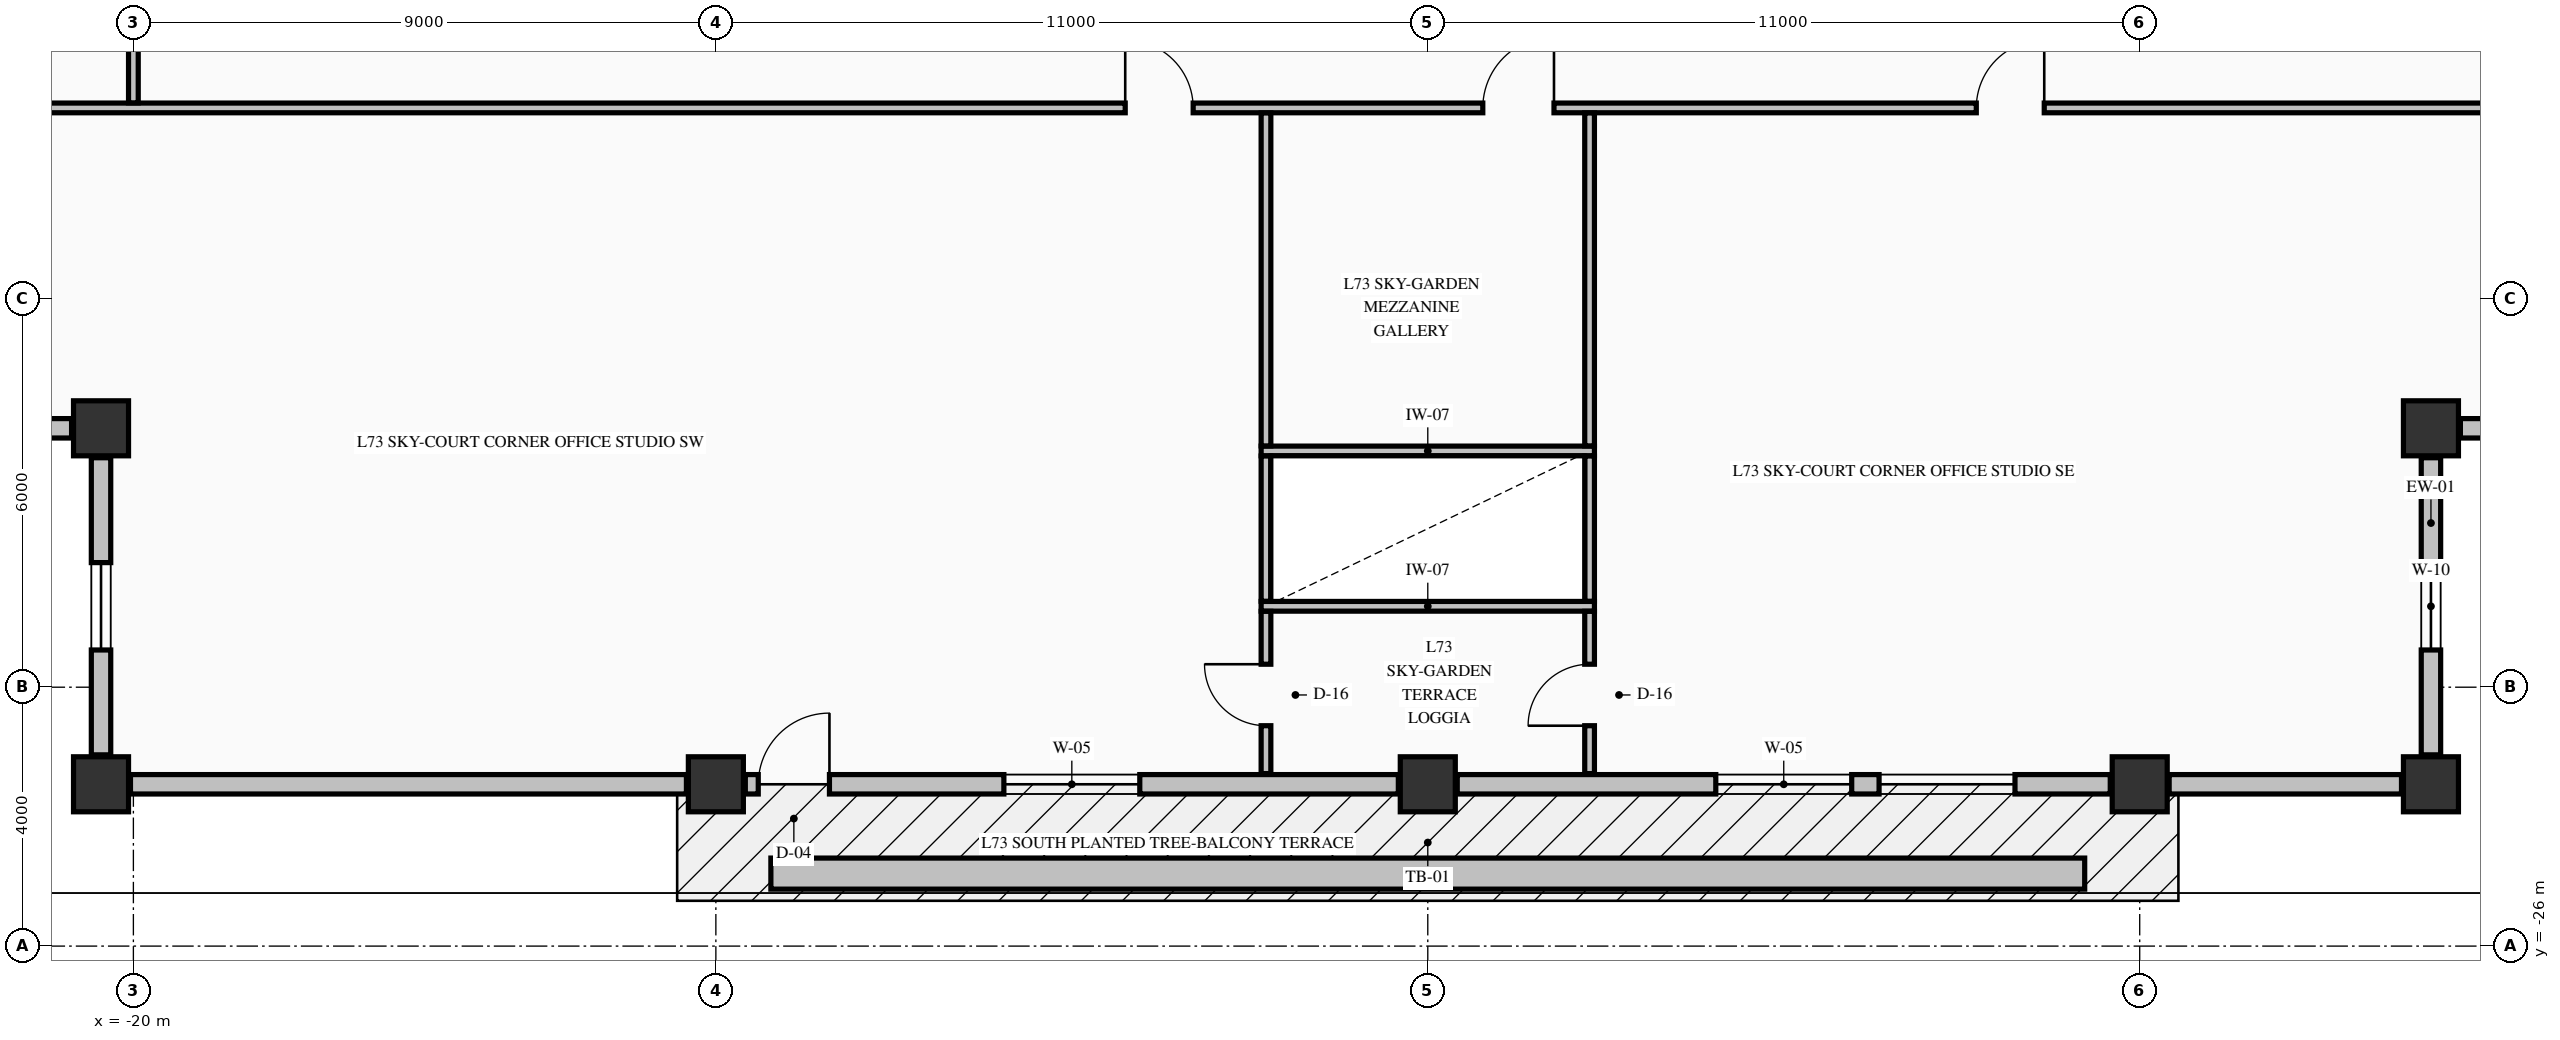
"""IFC4 building model, lengths in metres.
Left out: names, types, materials, properties, quantities, classifications, styles, units other than length and angle.
Written with IfcOpenShell. Run it as: python <this file> out.ifc"""

import sys

from ifc_helpers import new_model, si_unit, direction, frame, frame_2d, origin, origin_2d, place, context, subcontext, project, spatial, rectangle, extrude, element, fill, save


model = new_model("IFC4")
c1 = context("Model", 3, precision=1e-05, world=origin(), true_north=direction((0.0, 1.0)))
c2 = subcontext(c1, "Body", "Model", "MODEL_VIEW")
j1 = project(units=[si_unit("LENGTHUNIT", "METRE"), si_unit("PLANEANGLEUNIT", "RADIAN")], contexts=[c1])
p1 = place(None, origin())
s1 = spatial("IfcSite", under=j1, at=p1, CompositionType="ELEMENT")
p2 = place(p1, origin())
s2 = spatial("IfcBuilding", under=s1, at=p2, CompositionType="ELEMENT")
p3 = place(p2, frame((0.0, 0.0, 274.32)))
s3 = spatial("IfcBuildingStorey", under=s2, at=p3, CompositionType="ELEMENT", Elevation=274.32)
for number, where, z_axis, x_axis in (
    (1, (-20.5, -23.5, -0.25), (0.0, 0.0, 1.0), (1.0, 0.0, 0.0)),
    (2, (-11.0, -23.5, -0.25), (0.0, 0.0, 1.0), (1.0, 0.0, 0.0)),
    (3, (0.0, -23.5, -0.25), (0.0, 0.0, 1.0), (1.0, 0.0, 0.0)),
    (4, (11.0, -23.5, -0.25), (0.0, 0.0, 1.0), (1.0, 0.0, 0.0)),
    (5, (15.5, -23.5, -0.25), (0.0, 0.0, 1.0), (1.0, 0.0, 0.0)),
    (6, (-20.5, -18.0, -0.25), (0.0, 0.0, 1.0), (1.0, 0.0, 0.0)),
    (7, (15.5, -18.0, -0.25), (0.0, 0.0, 1.0), (1.0, 0.0, 0.0)),
):
    element("IfcColumn", number, at=place(p3, frame(where, z_axis=z_axis, x_axis=x_axis)), inside=s3, PredefinedType="COLUMN", context=c2, shape_type="SweptSolid", body=[
        extrude(rectangle(XDim=0.85, YDim=0.85, at=origin_2d()), origin(), (0.0, 0.0, 1.0), 3.565),
    ])
p4 = place(p3, frame((15.5, -23.045, 0.0), z_axis=(0.0, 0.0, 1.0), x_axis=(0.0, 1.0, 0.0)))
e8 = element("IfcWall", 8, at=p4, inside=s3, PredefinedType="STANDARD", context=c2, shape_type="SweptSolid", body=[
    extrude(rectangle(XDim=4.59, YDim=0.3, at=frame_2d((2.295, 0.0))), origin(), (0.0, 0.0, 1.0), 2.707),
])
p5 = place(p4, frame((1.62, 0.0, 0.68)))
e9 = element("IfcOpeningElement", 9, at=p5, cuts=e8, PredefinedType="OPENING", context=c2, shape_type="SweptSolid", body=[
    extrude(rectangle(XDim=1.35, YDim=1.42, at=frame_2d((0.675, 0.71))), frame((0.0, 0.16, 0.0), z_axis=(0.0, -1.0, 0.0), x_axis=(1.0, 0.0, 0.0)), (0.0, 0.0, 1.0), 0.32),
])
p6 = place(p3, frame((15.955, -18.0, 0.0), z_axis=(0.0, 0.0, 1.0), x_axis=(1.0, 0.0, 0.0)))
e10 = element("IfcWall", 10, at=p6, inside=s3, PredefinedType="STANDARD", context=c2, shape_type="SweptSolid", body=[
    extrude(rectangle(XDim=4.59, YDim=0.3, at=frame_2d((2.295, 0.0))), origin(), (0.0, 0.0, 1.0), 2.707),
])
p7 = place(p6, frame((1.62, 0.0, 0.68)))
e11 = element("IfcOpeningElement", 11, at=p7, cuts=e10, PredefinedType="OPENING", context=c2, shape_type="SweptSolid", body=[
    extrude(rectangle(XDim=1.35, YDim=1.42, at=frame_2d((0.675, 0.71))), frame((0.0, 0.16, 0.0), z_axis=(0.0, -1.0, 0.0), x_axis=(1.0, 0.0, 0.0)), (0.0, 0.0, 1.0), 0.32),
])
p8 = place(p3, frame((-25.545, -18.0, 0.0), z_axis=(0.0, 0.0, 1.0), x_axis=(1.0, 0.0, 0.0)))
e12 = element("IfcWall", 12, at=p8, inside=s3, PredefinedType="STANDARD", context=c2, shape_type="SweptSolid", body=[
    extrude(rectangle(XDim=4.59, YDim=0.3, at=frame_2d((2.295, 0.0))), origin(), (0.0, 0.0, 1.0), 2.707),
])
p9 = place(p8, frame((1.62, 0.0, 0.68)))
e13 = element("IfcOpeningElement", 13, at=p9, cuts=e12, PredefinedType="OPENING", context=c2, shape_type="SweptSolid", body=[
    extrude(rectangle(XDim=1.35, YDim=1.42, at=frame_2d((0.675, 0.71))), frame((0.0, 0.16, 0.0), z_axis=(0.0, -1.0, 0.0), x_axis=(1.0, 0.0, 0.0)), (0.0, 0.0, 1.0), 0.32),
])
p10 = place(p3, frame((-20.5, -18.455, 0.0), z_axis=(0.0, 0.0, 1.0), x_axis=(0.0, -1.0, 0.0)))
e14 = element("IfcWall", 14, at=p10, inside=s3, PredefinedType="STANDARD", context=c2, shape_type="SweptSolid", body=[
    extrude(rectangle(XDim=4.59, YDim=0.3, at=frame_2d((2.295, 0.0))), origin(), (0.0, 0.0, 1.0), 2.707),
])
p11 = place(p10, frame((1.62, 0.0, 0.68)))
e15 = element("IfcOpeningElement", 15, at=p11, cuts=e14, PredefinedType="OPENING", context=c2, shape_type="SweptSolid", body=[
    extrude(rectangle(XDim=1.35, YDim=1.42, at=frame_2d((0.675, 0.71))), frame((0.0, 0.16, 0.0), z_axis=(0.0, -1.0, 0.0), x_axis=(1.0, 0.0, 0.0)), (0.0, 0.0, 1.0), 0.32),
])
p12 = place(p3, frame((-20.045, -23.5, 0.0), z_axis=(0.0, 0.0, 1.0), x_axis=(1.0, 0.0, 0.0)))
e16 = element("IfcWall", 16, at=p12, inside=s3, PredefinedType="STANDARD", context=c2, shape_type="SweptSolid", body=[
    extrude(rectangle(XDim=8.59, YDim=0.3, at=frame_2d((4.295, 0.0))), origin(), (0.0, 0.0, 1.0), 2.707),
])
p13 = place(p3, frame((-10.545, -23.5, 0.0), z_axis=(0.0, 0.0, 1.0), x_axis=(1.0, 0.0, 0.0)))
e17 = element("IfcWall", 17, at=p13, inside=s3, PredefinedType="STANDARD", context=c2, shape_type="SweptSolid", body=[
    extrude(rectangle(XDim=10.09, YDim=0.3, at=frame_2d((5.045, 0.0))), origin(), (0.0, 0.0, 1.0), 2.707),
])
p14 = place(p13, frame((0.2, 0.0, 0.0)))
e18 = element("IfcOpeningElement", 18, at=p14, cuts=e17, PredefinedType="OPENING", context=c2, shape_type="SweptSolid", body=[
    extrude(rectangle(XDim=1.1, YDim=2.15, at=frame_2d((0.55, 1.075))), frame((0.0, 0.16, 0.0), z_axis=(0.0, -1.0, 0.0), x_axis=(1.0, 0.0, 0.0)), (0.0, 0.0, 1.0), 0.32),
])
p15 = place(p13, frame((3.995, 0.0, 0.7)))
e19 = element("IfcOpeningElement", 19, at=p15, cuts=e17, PredefinedType="OPENING", context=c2, shape_type="SweptSolid", body=[
    extrude(rectangle(XDim=2.1, YDim=1.5, at=frame_2d((1.05, 0.75))), frame((0.0, 0.16, 0.0), z_axis=(0.0, -1.0, 0.0), x_axis=(1.0, 0.0, 0.0)), (0.0, 0.0, 1.0), 0.32),
])
p16 = place(p3, frame((0.455, -23.5, 0.0), z_axis=(0.0, 0.0, 1.0), x_axis=(1.0, 0.0, 0.0)))
e20 = element("IfcWall", 20, at=p16, inside=s3, PredefinedType="STANDARD", context=c2, shape_type="SweptSolid", body=[
    extrude(rectangle(XDim=10.09, YDim=0.3, at=frame_2d((5.045, 0.0))), origin(), (0.0, 0.0, 1.0), 2.707),
])
p17 = place(p16, frame((3.995, 0.0, 0.7)))
e21 = element("IfcOpeningElement", 21, at=p17, cuts=e20, PredefinedType="OPENING", context=c2, shape_type="SweptSolid", body=[
    extrude(rectangle(XDim=2.1, YDim=1.5, at=frame_2d((1.05, 0.75))), frame((0.0, 0.16, 0.0), z_axis=(0.0, -1.0, 0.0), x_axis=(1.0, 0.0, 0.0)), (0.0, 0.0, 1.0), 0.32),
])
p18 = place(p16, frame((6.518, 0.0, 0.7)))
e22 = element("IfcOpeningElement", 22, at=p18, cuts=e20, PredefinedType="OPENING", context=c2, shape_type="SweptSolid", body=[
    extrude(rectangle(XDim=2.1, YDim=1.5, at=frame_2d((1.05, 0.75))), frame((0.0, 0.16, 0.0), z_axis=(0.0, -1.0, 0.0), x_axis=(1.0, 0.0, 0.0)), (0.0, 0.0, 1.0), 0.32),
])
p19 = place(p3, frame((11.455, -23.5, 0.0), z_axis=(0.0, 0.0, 1.0), x_axis=(1.0, 0.0, 0.0)))
e23 = element("IfcWall", 23, at=p19, inside=s3, PredefinedType="STANDARD", context=c2, shape_type="SweptSolid", body=[
    extrude(rectangle(XDim=3.59, YDim=0.3, at=frame_2d((1.795, 0.0))), origin(), (0.0, 0.0, 1.0), 2.707),
])
for number, where, z_axis, x_axis in (
    (24, (-2.575, -20.75, 0.0), (0.0, 0.0, 1.0), (1.0, 0.0, 0.0)),
    (25, (-2.575, -18.35, 0.0), (0.0, 0.0, 1.0), (1.0, 0.0, 0.0)),
):
    element("IfcWall", number, at=place(p3, frame(where, z_axis=z_axis, x_axis=x_axis)), inside=s3, PredefinedType="PARTITIONING", context=c2, shape_type="SweptSolid", body=[
        extrude(rectangle(XDim=5.15, YDim=0.15, at=frame_2d((2.575, 0.0))), origin(), (0.0, 0.0, 1.0), 3.315),
    ])
p20 = place(p3, frame((-25.835, -13.05, 0.0), z_axis=(0.0, 0.0, 1.0), x_axis=(1.0, 0.0, 0.0)))
e26 = element("IfcWall", 26, at=p20, inside=s3, PredefinedType="PARTITIONING", context=c2, shape_type="SweptSolid", body=[
    extrude(rectangle(XDim=45.91, YDim=0.15, at=frame_2d((22.955, 0.0))), origin(), (0.0, 0.0, 1.0), 3.315),
])
p21 = place(p20, frame((26.685, 0.0, 0.0)))
e27 = element("IfcOpeningElement", 27, at=p21, cuts=e26, PredefinedType="OPENING", context=c2, shape_type="SweptSolid", body=[
    extrude(rectangle(XDim=1.1, YDim=2.15, at=frame_2d((0.55, 1.075))), frame((0.0, 0.085, 0.0), z_axis=(0.0, -1.0, 0.0), x_axis=(1.0, 0.0, 0.0)), (0.0, 0.0, 1.0), 0.17),
])
p22 = place(p20, frame((21.16, 0.0, 0.0)))
e28 = element("IfcOpeningElement", 28, at=p22, cuts=e26, PredefinedType="OPENING", context=c2, shape_type="SweptSolid", body=[
    extrude(rectangle(XDim=1.05, YDim=2.15, at=frame_2d((0.525, 1.075))), frame((0.0, 0.085, 0.0), z_axis=(0.0, -1.0, 0.0), x_axis=(1.0, 0.0, 0.0)), (0.0, 0.0, 1.0), 0.17),
])
p23 = place(p20, frame((34.31, 0.0, 0.0)))
e29 = element("IfcOpeningElement", 29, at=p23, cuts=e26, PredefinedType="OPENING", context=c2, shape_type="SweptSolid", body=[
    extrude(rectangle(XDim=1.05, YDim=2.15, at=frame_2d((0.525, 1.075))), frame((0.0, 0.085, 0.0), z_axis=(0.0, -1.0, 0.0), x_axis=(1.0, 0.0, 0.0)), (0.0, 0.0, 1.0), 0.17),
])
p24 = place(p3, frame((-20.0, -12.972, 0.0), z_axis=(0.0, 0.0, 1.0), x_axis=(0.0, 1.0, 0.0)))
e30 = element("IfcWall", 30, at=p24, inside=s3, PredefinedType="PARTITIONING", context=c2, shape_type="SweptSolid", body=[
    extrude(rectangle(XDim=2.666, YDim=0.15, at=frame_2d((1.333, 0.0))), origin(), (0.0, 0.0, 1.0), 3.315),
])
p25 = place(p24, frame((0.997, 0.0, 0.0)))
e31 = element("IfcOpeningElement", 31, at=p25, cuts=e30, PredefinedType="OPENING", context=c2, shape_type="SweptSolid", body=[
    extrude(rectangle(XDim=0.95, YDim=2.15, at=frame_2d((0.475, 1.075))), frame((0.0, 0.085, 0.0), z_axis=(0.0, -1.0, 0.0), x_axis=(1.0, 0.0, 0.0)), (0.0, 0.0, 1.0), 0.17),
])
p26 = place(p3, frame((-2.5, -23.335, 0.0), z_axis=(0.0, 0.0, 1.0), x_axis=(0.0, 1.0, 0.0)))
e32 = element("IfcWall", 32, at=p26, inside=s3, PredefinedType="PARTITIONING", context=c2, shape_type="SweptSolid", body=[
    extrude(rectangle(XDim=2.507, YDim=0.15, at=frame_2d((1.253, 0.0))), origin(), (0.0, 0.0, 1.0), 3.315),
])
p27 = place(p26, frame((0.74, 0.0, 0.0)))
e33 = element("IfcOpeningElement", 33, at=p27, cuts=e32, PredefinedType="OPENING", context=c2, shape_type="SweptSolid", body=[
    extrude(rectangle(XDim=0.95, YDim=2.15, at=frame_2d((0.475, 1.075))), frame((0.0, 0.085, 0.0), z_axis=(0.0, -1.0, 0.0), x_axis=(1.0, 0.0, 0.0)), (0.0, 0.0, 1.0), 0.17),
])
p28 = place(p3, frame((-2.5, -20.672, 0.0), z_axis=(0.0, 0.0, 1.0), x_axis=(0.0, 1.0, 0.0)))
e34 = element("IfcWall", 34, at=p28, inside=s3, PredefinedType="PARTITIONING", context=c2, shape_type="SweptSolid", body=[
    extrude(rectangle(XDim=2.244, YDim=0.15, at=frame_2d((1.122, 0.0))), origin(), (0.0, 0.0, 1.0), 3.315),
])
p29 = place(p3, frame((-2.5, -18.272, 0.0), z_axis=(0.0, 0.0, 1.0), x_axis=(0.0, 1.0, 0.0)))
e35 = element("IfcWall", 35, at=p29, inside=s3, PredefinedType="PARTITIONING", context=c2, shape_type="SweptSolid", body=[
    extrude(rectangle(XDim=5.144, YDim=0.15, at=frame_2d((2.572, 0.0))), origin(), (0.0, 0.0, 1.0), 3.315),
])
p30 = place(p3, frame((2.5, -23.335, 0.0), z_axis=(0.0, 0.0, 1.0), x_axis=(0.0, 1.0, 0.0)))
e36 = element("IfcWall", 36, at=p30, inside=s3, PredefinedType="PARTITIONING", context=c2, shape_type="SweptSolid", body=[
    extrude(rectangle(XDim=2.507, YDim=0.15, at=frame_2d((1.253, 0.0))), origin(), (0.0, 0.0, 1.0), 3.315),
])
p31 = place(p30, frame((0.74, 0.0, 0.0)))
e37 = element("IfcOpeningElement", 37, at=p31, cuts=e36, PredefinedType="OPENING", context=c2, shape_type="SweptSolid", body=[
    extrude(rectangle(XDim=0.95, YDim=2.15, at=frame_2d((0.475, 1.075))), frame((0.0, 0.085, 0.0), z_axis=(0.0, -1.0, 0.0), x_axis=(1.0, 0.0, 0.0)), (0.0, 0.0, 1.0), 0.17),
])
p32 = place(p3, frame((2.5, -20.672, 0.0), z_axis=(0.0, 0.0, 1.0), x_axis=(0.0, 1.0, 0.0)))
e38 = element("IfcWall", 38, at=p32, inside=s3, PredefinedType="PARTITIONING", context=c2, shape_type="SweptSolid", body=[
    extrude(rectangle(XDim=2.244, YDim=0.15, at=frame_2d((1.122, 0.0))), origin(), (0.0, 0.0, 1.0), 3.315),
])
p33 = place(p3, frame((2.5, -18.272, 0.0), z_axis=(0.0, 0.0, 1.0), x_axis=(0.0, 1.0, 0.0)))
e39 = element("IfcWall", 39, at=p33, inside=s3, PredefinedType="PARTITIONING", context=c2, shape_type="SweptSolid", body=[
    extrude(rectangle(XDim=5.144, YDim=0.15, at=frame_2d((2.572, 0.0))), origin(), (0.0, 0.0, 1.0), 3.315),
])
p34 = place(p3, frame((-10.15, -24.88, -0.04), z_axis=(0.0, 0.0, 1.0), x_axis=(1.0, 0.0, 0.0)))
e40 = element("IfcWall", 40, at=p34, inside=s3, PredefinedType="PARAPET", context=c2, shape_type="SweptSolid", body=[
    extrude(rectangle(XDim=20.3, YDim=0.48, at=frame_2d((10.15, 0.0))), origin(), (0.0, 0.0, 1.0), 0.52),
])
p35 = place(p5, origin())
e41 = element("IfcWindow", 41, at=p35, inside=s3, PartitioningType="SINGLE_PANEL", PredefinedType="WINDOW", context=c2, shape_type="SweptSolid", body=[
    extrude(rectangle(XDim=1.35, YDim=1.42, at=frame_2d((0.675, 0.71))), frame((0.0, 0.03, 0.0), z_axis=(0.0, -1.0, 0.0), x_axis=(1.0, 0.0, 0.0)), (0.0, 0.0, 1.0), 0.06),
])
fill(e9, e41)
p36 = place(p11, origin())
e42 = element("IfcWindow", 42, at=p36, inside=s3, PartitioningType="SINGLE_PANEL", PredefinedType="WINDOW", context=c2, shape_type="SweptSolid", body=[
    extrude(rectangle(XDim=1.35, YDim=1.42, at=frame_2d((0.675, 0.71))), frame((0.0, 0.03, 0.0), z_axis=(0.0, -1.0, 0.0), x_axis=(1.0, 0.0, 0.0)), (0.0, 0.0, 1.0), 0.06),
])
fill(e15, e42)
p37 = place(p14, origin())
e43 = element("IfcDoor", 43, at=p37, inside=s3, OperationType="SINGLE_SWING_RIGHT", PredefinedType="DOOR", context=c2, shape_type="SweptSolid", body=[
    extrude(rectangle(XDim=1.1, YDim=2.15, at=frame_2d((0.55, 1.075))), frame((0.0, 0.025, 0.0), z_axis=(0.0, -1.0, 0.0), x_axis=(1.0, 0.0, 0.0)), (0.0, 0.0, 1.0), 0.05),
])
fill(e18, e43)
p38 = place(p15, origin())
e44 = element("IfcWindow", 44, at=p38, inside=s3, PartitioningType="SINGLE_PANEL", PredefinedType="WINDOW", context=c2, shape_type="SweptSolid", body=[
    extrude(rectangle(XDim=2.1, YDim=1.5, at=frame_2d((1.05, 0.75))), frame((0.0, 0.03, 0.0), z_axis=(0.0, -1.0, 0.0), x_axis=(1.0, 0.0, 0.0)), (0.0, 0.0, 1.0), 0.06),
])
fill(e19, e44)
p39 = place(p17, origin())
e45 = element("IfcWindow", 45, at=p39, inside=s3, PartitioningType="SINGLE_PANEL", PredefinedType="WINDOW", context=c2, shape_type="SweptSolid", body=[
    extrude(rectangle(XDim=2.1, YDim=1.5, at=frame_2d((1.05, 0.75))), frame((0.0, 0.03, 0.0), z_axis=(0.0, -1.0, 0.0), x_axis=(1.0, 0.0, 0.0)), (0.0, 0.0, 1.0), 0.06),
])
fill(e21, e45)
p40 = place(p18, origin())
e46 = element("IfcWindow", 46, at=p40, inside=s3, PartitioningType="SINGLE_PANEL", PredefinedType="WINDOW", context=c2, shape_type="SweptSolid", body=[
    extrude(rectangle(XDim=2.1, YDim=1.5, at=frame_2d((1.05, 0.75))), frame((0.0, 0.03, 0.0), z_axis=(0.0, -1.0, 0.0), x_axis=(1.0, 0.0, 0.0)), (0.0, 0.0, 1.0), 0.06),
])
fill(e22, e46)
p41 = place(p27, origin())
e47 = element("IfcDoor", 47, at=p41, inside=s3, OperationType="SINGLE_SWING_RIGHT", PredefinedType="DOOR", context=c2, shape_type="SweptSolid", body=[
    extrude(rectangle(XDim=0.95, YDim=2.15, at=frame_2d((0.475, 1.075))), frame((0.0, 0.025, 0.0), z_axis=(0.0, -1.0, 0.0), x_axis=(1.0, 0.0, 0.0)), (0.0, 0.0, 1.0), 0.05),
])
fill(e33, e47)
p42 = place(p31, origin())
e48 = element("IfcDoor", 48, at=p42, inside=s3, OperationType="SINGLE_SWING_LEFT", PredefinedType="DOOR", context=c2, shape_type="SweptSolid", body=[
    extrude(rectangle(XDim=0.95, YDim=2.15, at=frame_2d((0.475, 1.075))), frame((0.0, 0.025, 0.0), z_axis=(0.0, -1.0, 0.0), x_axis=(1.0, 0.0, 0.0)), (0.0, 0.0, 1.0), 0.05),
])
fill(e37, e48)
p43 = place(p21, origin())
e49 = element("IfcDoor", 49, at=p43, inside=s3, OperationType="SINGLE_SWING_RIGHT", PredefinedType="DOOR", context=c2, shape_type="SweptSolid", body=[
    extrude(rectangle(XDim=1.1, YDim=2.15, at=frame_2d((0.55, 1.075))), frame((0.0, 0.025, 0.0), z_axis=(0.0, -1.0, 0.0), x_axis=(1.0, 0.0, 0.0)), (0.0, 0.0, 1.0), 0.05),
])
fill(e27, e49)
p44 = place(p22, origin())
e50 = element("IfcDoor", 50, at=p44, inside=s3, OperationType="SINGLE_SWING_LEFT", PredefinedType="DOOR", context=c2, shape_type="SweptSolid", body=[
    extrude(rectangle(XDim=1.05, YDim=2.15, at=frame_2d((0.525, 1.075))), frame((0.0, 0.025, 0.0), z_axis=(0.0, -1.0, 0.0), x_axis=(1.0, 0.0, 0.0)), (0.0, 0.0, 1.0), 0.05),
])
fill(e28, e50)
p45 = place(p23, origin())
e51 = element("IfcDoor", 51, at=p45, inside=s3, OperationType="SINGLE_SWING_RIGHT", PredefinedType="DOOR", context=c2, shape_type="SweptSolid", body=[
    extrude(rectangle(XDim=1.05, YDim=2.15, at=frame_2d((0.525, 1.075))), frame((0.0, 0.025, 0.0), z_axis=(0.0, -1.0, 0.0), x_axis=(1.0, 0.0, 0.0)), (0.0, 0.0, 1.0), 0.05),
])
fill(e29, e51)
save(model, sys.argv[1])
